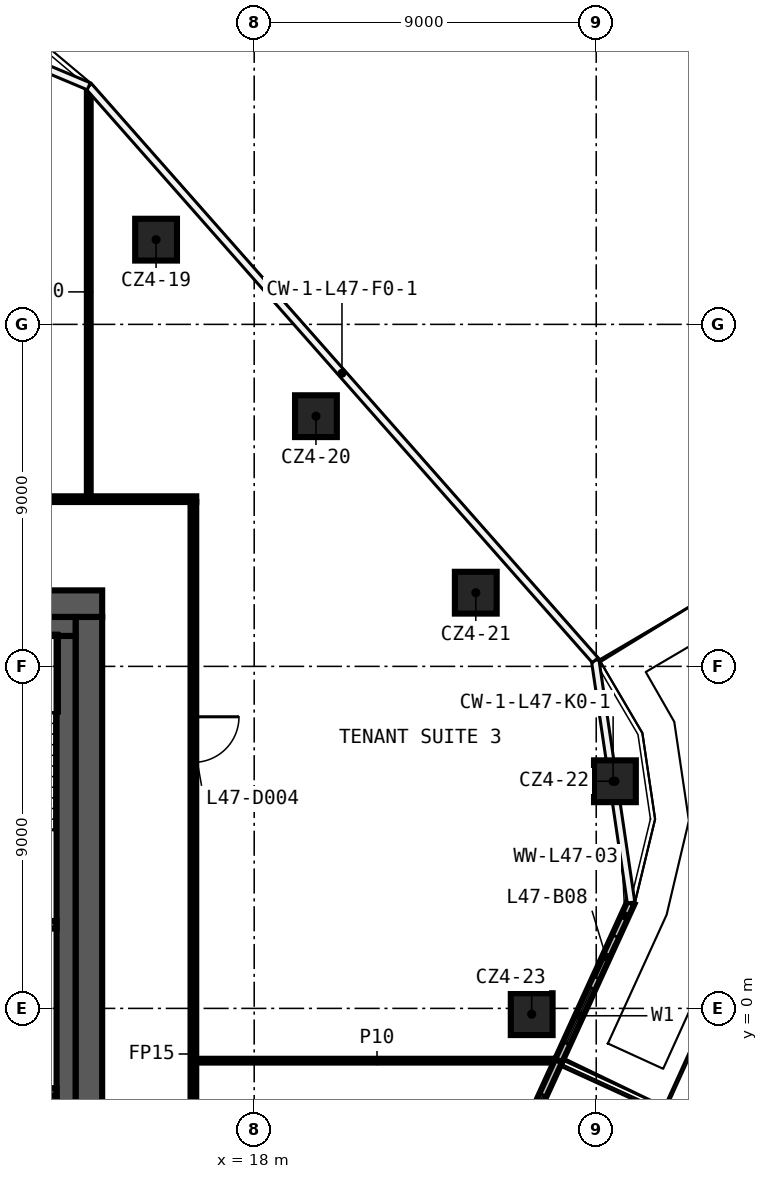
"""IFC4 building model, lengths in metres.
Left out: names, types, materials, properties, quantities, classifications, styles, units other than length and angle.
Written with IfcOpenShell. Run it as: python <this file> out.ifc"""

import sys

from ifc_helpers import new_model, si_unit, direction, frame, frame_2d, origin, origin_2d, place, context, subcontext, project, spatial, rectangle, extrude, element, fill, save


model = new_model("IFC4")
c1 = context("Model", 3, precision=1e-05, world=origin(), true_north=direction((0.0, 1.0)))
c2 = subcontext(c1, "Body", "Model", "MODEL_VIEW")
j1 = project(units=[si_unit("LENGTHUNIT", "METRE"), si_unit("PLANEANGLEUNIT", "RADIAN")], contexts=[c1])
p1 = place(None, origin())
s1 = spatial("IfcSite", under=j1, at=p1, CompositionType="ELEMENT")
p2 = place(p1, origin())
s2 = spatial("IfcBuilding", under=s1, at=p2, CompositionType="ELEMENT")
p3 = place(p2, frame((0.0, 0.0, 228.6)))
s3 = spatial("IfcBuildingStorey", under=s2, at=p3, CompositionType="ELEMENT", Elevation=228.6)
for number, where, z_axis, x_axis in (
    (1, (15.418, 20.229, 0.0), (0.0, 0.0, 1.0), (1.0, 0.0, 0.0)),
    (2, (19.625, 15.584, 0.0), (0.0, 0.0, 1.0), (1.0, 0.0, 0.0)),
    (3, (23.831, 10.939, 0.0), (0.0, 0.0, 1.0), (1.0, 0.0, 0.0)),
    (4, (27.492, 5.977, 0.0), (0.0, 0.0, 1.0), (1.0, 0.0, 0.0)),
    (5, (25.302, -0.152, 0.0), (0.0, 0.0, 1.0), (1.0, 0.0, 0.0)),
):
    element("IfcColumn", number, at=place(p3, frame(where, z_axis=z_axis, x_axis=x_axis)), inside=s3, PredefinedType="COLUMN", context=c2, shape_type="SweptSolid", body=[
        extrude(rectangle(XDim=1.1, YDim=1.1, at=origin_2d()), origin(), (0.0, 0.0, 1.0), 3.75),
    ])
p4 = place(p3, frame((16.475, -1.376, 0.0), z_axis=(0.0, 0.0, 1.0), x_axis=(1.0, 0.0, 0.0)))
e6 = element("IfcWall", 6, at=p4, inside=s3, PredefinedType="PARTITIONING", context=c2, shape_type="SweptSolid", body=[
    extrude(rectangle(XDim=9.514, YDim=0.1, at=frame_2d((4.757, 0.0))), origin(), (0.0, 0.0, 1.0), 3.75),
])
p5 = place(p3, frame((-2.075, 13.4, 0.0), z_axis=(0.0, 0.0, 1.0), x_axis=(1.0, 0.0, 0.0)))
e7 = element("IfcWall", 7, at=p5, inside=s3, PredefinedType="PARTITIONING", context=c2, shape_type="SweptSolid", body=[
    extrude(rectangle(XDim=18.55, YDim=0.15, at=frame_2d((9.275, 0.0))), origin(), (0.0, 0.0, 1.0), 3.75),
])
p6 = place(p5, frame((2.91, 0.0, 0.0)))
e8 = element("IfcOpeningElement", 8, at=p6, cuts=e7, PredefinedType="OPENING", context=c2, shape_type="SweptSolid", body=[
    extrude(rectangle(XDim=1.2, YDim=2.1, at=frame_2d((0.6, 1.05))), frame((0.0, 0.085, 0.0), z_axis=(0.0, -1.0, 0.0), x_axis=(1.0, 0.0, 0.0)), (0.0, 0.0, 1.0), 0.17),
])
p7 = place(p5, frame((7.894, 0.0, 0.0)))
e9 = element("IfcOpeningElement", 9, at=p7, cuts=e7, PredefinedType="OPENING", context=c2, shape_type="SweptSolid", body=[
    extrude(rectangle(XDim=1.2, YDim=2.1, at=frame_2d((0.6, 1.05))), frame((0.0, 0.085, 0.0), z_axis=(0.0, -1.0, 0.0), x_axis=(1.0, 0.0, 0.0)), (0.0, 0.0, 1.0), 0.17),
])
p8 = place(p3, frame((16.4, 13.325, 0.0), z_axis=(0.0, 0.0, 1.0), x_axis=(0.0, -1.0, 0.0)))
e10 = element("IfcWall", 10, at=p8, inside=s3, PredefinedType="PARTITIONING", context=c2, shape_type="SweptSolid", body=[
    extrude(rectangle(XDim=26.65, YDim=0.15, at=frame_2d((13.325, 0.0))), origin(), (0.0, 0.0, 1.0), 3.75),
])
p9 = place(p8, frame((22.199, 0.0, 0.0)))
e11 = element("IfcOpeningElement", 11, at=p9, cuts=e10, PredefinedType="OPENING", context=c2, shape_type="SweptSolid", body=[
    extrude(rectangle(XDim=1.2, YDim=2.1, at=frame_2d((0.6, 1.05))), frame((0.0, 0.085, 0.0), z_axis=(0.0, -1.0, 0.0), x_axis=(1.0, 0.0, 0.0)), (0.0, 0.0, 1.0), 0.17),
])
p10 = place(p8, frame((5.651, 0.0, 0.0)))
e12 = element("IfcOpeningElement", 12, at=p10, cuts=e10, PredefinedType="OPENING", context=c2, shape_type="SweptSolid", body=[
    extrude(rectangle(XDim=1.2, YDim=2.1, at=frame_2d((0.6, 1.05))), frame((0.0, 0.085, 0.0), z_axis=(0.0, -1.0, 0.0), x_axis=(1.0, 0.0, 0.0)), (0.0, 0.0, 1.0), 0.17),
])
p11 = place(p3, frame((13.647, 13.475, 0.0), z_axis=(0.0, 0.0, 1.0), x_axis=(0.0, 1.0, 0.0)))
e13 = element("IfcWall", 13, at=p11, inside=s3, PredefinedType="PARTITIONING", context=c2, shape_type="SweptSolid", body=[
    extrude(rectangle(XDim=10.76, YDim=0.1, at=frame_2d((5.38, 0.0))), origin(), (0.0, 0.0, 1.0), 3.75),
])
p12 = place(p3, frame((20.283, -13.892, 0.0), z_axis=(0.0, 0.0, 1.0), x_axis=(0.416106802435, 0.909315747674, 0.0)))
e14 = element("IfcWall", 14, at=p12, inside=s3, PredefinedType="SOLIDWALL", context=c2, shape_type="SweptSolid", body=[
    extrude(rectangle(XDim=13.765, YDim=0.2, at=frame_2d((6.882, 0.0))), origin(), (0.0, 0.0, 1.0), 3.75),
])
p13 = place(p12, frame((0.5, 0.0, 0.6)))
e15 = element("IfcOpeningElement", 15, at=p13, cuts=e14, PredefinedType="OPENING", context=c2, shape_type="SweptSolid", body=[
    extrude(rectangle(XDim=1.6, YDim=2.4, at=frame_2d((0.8, 1.2))), frame((0.0, 0.11, 0.0), z_axis=(0.0, -1.0, 0.0), x_axis=(1.0, 0.0, 0.0)), (0.0, 0.0, 1.0), 0.22),
])
p14 = place(p12, frame((2.4, 0.0, 0.0)))
e16 = element("IfcOpeningElement", 16, at=p14, cuts=e14, PredefinedType="OPENING", context=c2, shape_type="SweptSolid", body=[
    extrude(rectangle(XDim=1.2, YDim=2.4, at=frame_2d((0.6, 1.2))), frame((0.0, 0.11, 0.0), z_axis=(0.0, -1.0, 0.0), x_axis=(1.0, 0.0, 0.0)), (0.0, 0.0, 1.0), 0.22),
])
p15 = place(p12, frame((6.588, 0.0, 0.6)))
e17 = element("IfcOpeningElement", 17, at=p15, cuts=e14, PredefinedType="OPENING", context=c2, shape_type="SweptSolid", body=[
    extrude(rectangle(XDim=1.6, YDim=2.4, at=frame_2d((0.8, 1.2))), frame((0.0, 0.11, 0.0), z_axis=(0.0, -1.0, 0.0), x_axis=(1.0, 0.0, 0.0)), (0.0, 0.0, 1.0), 0.22),
])
p16 = place(p12, frame((5.088, 0.0, 0.0)))
e18 = element("IfcOpeningElement", 18, at=p16, cuts=e14, PredefinedType="OPENING", context=c2, shape_type="SweptSolid", body=[
    extrude(rectangle(XDim=1.2, YDim=2.4, at=frame_2d((0.6, 1.2))), frame((0.0, 0.11, 0.0), z_axis=(0.0, -1.0, 0.0), x_axis=(1.0, 0.0, 0.0)), (0.0, 0.0, 1.0), 0.22),
])
p17 = place(p12, frame((11.176, 0.0, 0.6)))
e19 = element("IfcOpeningElement", 19, at=p17, cuts=e14, PredefinedType="OPENING", context=c2, shape_type="SweptSolid", body=[
    extrude(rectangle(XDim=1.6, YDim=2.4, at=frame_2d((0.8, 1.2))), frame((0.0, 0.11, 0.0), z_axis=(0.0, -1.0, 0.0), x_axis=(1.0, 0.0, 0.0)), (0.0, 0.0, 1.0), 0.22),
])
p18 = place(p12, frame((9.676, 0.0, 0.0)))
e20 = element("IfcOpeningElement", 20, at=p18, cuts=e14, PredefinedType="OPENING", context=c2, shape_type="SweptSolid", body=[
    extrude(rectangle(XDim=1.2, YDim=2.4, at=frame_2d((0.6, 1.2))), frame((0.0, 0.11, 0.0), z_axis=(0.0, -1.0, 0.0), x_axis=(1.0, 0.0, 0.0)), (0.0, 0.0, 1.0), 0.22),
])
p19 = place(p3, frame((26.011, -1.376, 0.0), z_axis=(0.0, 0.0, 1.0), x_axis=(0.416127690122, 0.909306189088, 0.0)))
e21 = element("IfcWall", 21, at=p19, inside=s3, PredefinedType="SOLIDWALL", context=c2, shape_type="SweptSolid", body=[
    extrude(rectangle(XDim=4.579, YDim=0.2, at=frame_2d((2.289, 0.0))), origin(), (0.0, 0.0, 1.0), 3.75),
])
p20 = place(p19, frame((0.5, 0.0, 0.6)))
e22 = element("IfcOpeningElement", 22, at=p20, cuts=e21, PredefinedType="OPENING", context=c2, shape_type="SweptSolid", body=[
    extrude(rectangle(XDim=1.6, YDim=2.4, at=frame_2d((0.8, 1.2))), frame((0.0, 0.11, 0.0), z_axis=(0.0, -1.0, 0.0), x_axis=(1.0, 0.0, 0.0)), (0.0, 0.0, 1.0), 0.22),
])
p21 = place(p19, frame((2.4, 0.0, 0.0)))
e23 = element("IfcOpeningElement", 23, at=p21, cuts=e21, PredefinedType="OPENING", context=c2, shape_type="SweptSolid", body=[
    extrude(rectangle(XDim=1.2, YDim=2.4, at=frame_2d((0.6, 1.2))), frame((0.0, 0.11, 0.0), z_axis=(0.0, -1.0, 0.0), x_axis=(1.0, 0.0, 0.0)), (0.0, 0.0, 1.0), 0.22),
])
p22 = place(p3, frame((-14.0, 10.65, 0.0), z_axis=(0.0, 0.0, 1.0), x_axis=(1.0, 0.0, 0.0)))
e24 = element("IfcWall", 24, at=p22, inside=s3, PredefinedType="SHEAR", context=c2, shape_type="SweptSolid", body=[
    extrude(rectangle(XDim=28.0, YDim=0.7, at=frame_2d((14.0, 0.0))), origin(), (0.0, 0.0, 1.0), 3.75),
])
p23 = place(p22, frame((15.9, 0.0, 0.0)))
e25 = element("IfcOpeningElement", 25, at=p23, cuts=e24, PredefinedType="OPENING", context=c2, shape_type="SweptSolid", body=[
    extrude(rectangle(XDim=1.6, YDim=2.1, at=frame_2d((0.8, 1.05))), frame((0.0, 0.36, 0.0), z_axis=(0.0, -1.0, 0.0), x_axis=(1.0, 0.0, 0.0)), (0.0, 0.0, 1.0), 0.72),
])
p24 = place(p3, frame((13.65, 10.3, 0.0), z_axis=(0.0, 0.0, 1.0), x_axis=(0.0, -1.0, 0.0)))
e26 = element("IfcWall", 26, at=p24, inside=s3, PredefinedType="SHEAR", context=c2, shape_type="SweptSolid", body=[
    extrude(rectangle(XDim=20.6, YDim=0.7, at=frame_2d((10.3, 0.0))), origin(), (0.0, 0.0, 1.0), 3.75),
])
p25 = place(p3, frame((3.9, 10.05, 0.0), z_axis=(0.0, 0.0, 1.0), x_axis=(1.0, 0.0, 0.0)))
e27 = element("IfcWall", 27, at=p25, inside=s3, PredefinedType="SHEAR", context=c2, shape_type="SweptSolid", body=[
    extrude(rectangle(XDim=9.4, YDim=0.5, at=frame_2d((4.7, 0.0))), origin(), (0.0, 0.0, 1.0), 3.75),
])
p26 = place(p3, frame((13.05, 9.8, 0.0), z_axis=(0.0, 0.0, 1.0), x_axis=(0.0, -1.0, 0.0)))
e28 = element("IfcWall", 28, at=p26, inside=s3, PredefinedType="SHEAR", context=c2, shape_type="SweptSolid", body=[
    extrude(rectangle(XDim=19.6, YDim=0.5, at=frame_2d((9.8, 0.0))), origin(), (0.0, 0.0, 1.0), 3.75),
])
for number, where, z_axis, x_axis in (
    (29, (9.45, 2.2, 0.0), (0.0, 0.0, 1.0), (1.0, 0.0, 0.0)),
    (30, (9.45, -2.2, 0.0), (0.0, 0.0, 1.0), (1.0, 0.0, 0.0)),
):
    element("IfcWall", number, at=place(p3, frame(where, z_axis=z_axis, x_axis=x_axis)), inside=s3, PredefinedType="SHEAR", context=c2, shape_type="SweptSolid", body=[
        extrude(rectangle(XDim=3.35, YDim=0.2, at=frame_2d((1.675, 0.0))), origin(), (0.0, 0.0, 1.0), 3.75),
    ])
p27 = place(p10, origin())
e31 = element("IfcDoor", 31, at=p27, inside=s3, OperationType="SINGLE_SWING_LEFT", PredefinedType="DOOR", context=c2, shape_type="SweptSolid", body=[
    extrude(rectangle(XDim=1.2, YDim=2.1, at=frame_2d((0.6, 1.05))), frame((0.0, 0.025, 0.0), z_axis=(0.0, -1.0, 0.0), x_axis=(1.0, 0.0, 0.0)), (0.0, 0.0, 1.0), 0.05),
])
fill(e12, e31)
p28 = place(p17, origin())
e32 = element("IfcWindow", 32, at=p28, inside=s3, PartitioningType="SINGLE_PANEL", PredefinedType="WINDOW", context=c2, shape_type="SweptSolid", body=[
    extrude(rectangle(XDim=1.6, YDim=2.4, at=frame_2d((0.8, 1.2))), frame((0.0, 0.03, 0.0), z_axis=(0.0, -1.0, 0.0), x_axis=(1.0, 0.0, 0.0)), (0.0, 0.0, 1.0), 0.06),
])
fill(e19, e32)
p29 = place(p20, origin())
e33 = element("IfcWindow", 33, at=p29, inside=s3, PartitioningType="SINGLE_PANEL", PredefinedType="WINDOW", context=c2, shape_type="SweptSolid", body=[
    extrude(rectangle(XDim=1.6, YDim=2.4, at=frame_2d((0.8, 1.2))), frame((0.0, 0.03, 0.0), z_axis=(0.0, -1.0, 0.0), x_axis=(1.0, 0.0, 0.0)), (0.0, 0.0, 1.0), 0.06),
])
fill(e22, e33)
p30 = place(p21, origin())
e34 = element("IfcDoor", 34, at=p30, inside=s3, OperationType="SLIDING_TO_LEFT", PredefinedType="DOOR", context=c2, shape_type="SweptSolid", body=[
    extrude(rectangle(XDim=1.2, YDim=2.4, at=frame_2d((0.6, 1.2))), frame((0.0, 0.025, 0.0), z_axis=(0.0, -1.0, 0.0), x_axis=(1.0, 0.0, 0.0)), (0.0, 0.0, 1.0), 0.05),
])
fill(e23, e34)
save(model, sys.argv[1])
